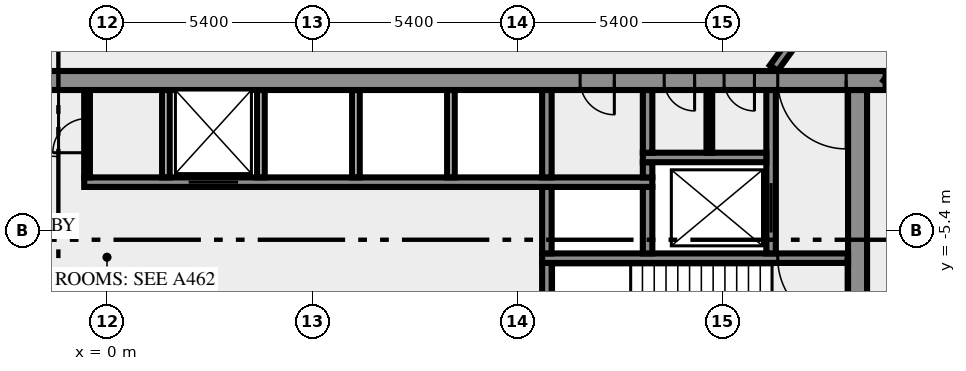
"""IFC4 building model, lengths in metres.
Left out: names, types, materials, properties, quantities, classifications, styles, units other than length and angle.
Written with IfcOpenShell. Run it as: python <this file> out.ifc"""

import sys

from ifc_helpers import new_model, si_unit, direction, frame, frame_2d, origin, place, context, subcontext, project, spatial, rectangle, extrude, element, fill, save


model = new_model("IFC4")
c1 = context("Model", 3, precision=1e-05, world=origin(), true_north=direction((0.0, 1.0)))
c2 = subcontext(c1, "Body", "Model", "MODEL_VIEW")
j1 = project(units=[si_unit("LENGTHUNIT", "METRE"), si_unit("PLANEANGLEUNIT", "RADIAN")], contexts=[c1])
p1 = place(None, origin())
s1 = spatial("IfcSite", under=j1, at=p1, CompositionType="ELEMENT")
p2 = place(p1, origin())
s2 = spatial("IfcBuilding", under=s1, at=p2, CompositionType="ELEMENT")
p3 = place(p2, frame((0.0, 0.0, 75.0)))
s3 = spatial("IfcBuildingStorey", under=s2, at=p3, CompositionType="ELEMENT", Elevation=75.0)
p4 = place(p3, frame((19.75, -10.5, 0.0), z_axis=(0.0, 0.0, 1.0), x_axis=(0.0, 1.0, 0.0)))
e1 = element("IfcWall", 1, at=p4, inside=s3, PredefinedType="SHEAR", context=c2, shape_type="SweptSolid", body=[
    extrude(rectangle(XDim=8.8, YDim=0.5, at=frame_2d((4.4, 0.0))), origin(), (0.0, 0.0, 1.0), 3.4),
])
p5 = place(p3, frame((11.575, -7.25, 0.0), z_axis=(0.0, 0.0, 1.0), x_axis=(0.0, 1.0, 0.0)))
e2 = element("IfcWall", 2, at=p5, inside=s3, PredefinedType="SHEAR", context=c2, shape_type="SweptSolid", body=[
    extrude(rectangle(XDim=1.0, YDim=0.25, at=frame_2d((0.5, 0.0))), origin(), (0.0, 0.0, 1.0), 3.4),
])
p6 = place(p3, frame((19.5, -6.125, 0.0), z_axis=(0.0, 0.0, 1.0), x_axis=(-1.0, 0.0, 0.0)))
e3 = element("IfcWall", 3, at=p6, inside=s3, PredefinedType="SHEAR", context=c2, shape_type="SweptSolid", body=[
    extrude(rectangle(XDim=8.05, YDim=0.25, at=frame_2d((4.025, 0.0))), origin(), (0.0, 0.0, 1.0), 3.4),
])
p7 = place(p6, frame((0.05, 0.0, 0.0)))
e4 = element("IfcOpeningElement", 4, at=p7, cuts=e3, PredefinedType="OPENING", context=c2, shape_type="SweptSolid", body=[
    extrude(rectangle(XDim=1.8, YDim=2.1, at=frame_2d((0.9, 1.05))), frame((0.0, 0.135, 0.0), z_axis=(0.0, -1.0, 0.0), x_axis=(1.0, 0.0, 0.0)), (0.0, 0.0, 1.0), 0.27),
])
for number, where, z_axis, x_axis in (
    (5, (11.575, -6.0, 0.0), (0.0, 0.0, 1.0), (0.0, 1.0, 0.0)),
    (6, (14.225, -6.0, 0.0), (0.0, 0.0, 1.0), (0.0, 1.0, 0.0)),
):
    element("IfcWall", number, at=place(p3, frame(where, z_axis=z_axis, x_axis=x_axis)), inside=s3, PredefinedType="SHEAR", context=c2, shape_type="SweptSolid", body=[
        extrude(rectangle(XDim=1.75, YDim=0.25, at=frame_2d((0.875, 0.0))), origin(), (0.0, 0.0, 1.0), 3.4),
    ])
p8 = place(p3, frame((17.475, -6.0, 0.0), z_axis=(0.0, 0.0, 1.0), x_axis=(0.0, 1.0, 0.0)))
e7 = element("IfcWall", 7, at=p8, inside=s3, PredefinedType="SHEAR", context=c2, shape_type="SweptSolid", body=[
    extrude(rectangle(XDim=4.3, YDim=0.25, at=frame_2d((2.15, 0.0))), origin(), (0.0, 0.0, 1.0), 3.4),
])
p9 = place(p8, frame((0.55, 0.0, 0.0)))
e8 = element("IfcOpeningElement", 8, at=p9, cuts=e7, PredefinedType="OPENING", context=c2, shape_type="SweptSolid", body=[
    extrude(rectangle(XDim=1.3, YDim=2.1, at=frame_2d((0.65, 1.05))), frame((0.0, 0.135, 0.0), z_axis=(0.0, -1.0, 0.0), x_axis=(1.0, 0.0, 0.0)), (0.0, 0.0, 1.0), 0.27),
])
p10 = place(p3, frame((-0.6, -4.125, 0.0), z_axis=(0.0, 0.0, 1.0), x_axis=(1.0, 0.0, 0.0)))
e9 = element("IfcWall", 9, at=p10, inside=s3, PredefinedType="SHEAR", context=c2, shape_type="SweptSolid", body=[
    extrude(rectangle(XDim=14.95, YDim=0.25, at=frame_2d((7.475, 0.0))), origin(), (0.0, 0.0, 1.0), 3.4),
])
p11 = place(p10, frame((2.75, 0.0, 0.0)))
e10 = element("IfcOpeningElement", 10, at=p11, cuts=e9, PredefinedType="OPENING", context=c2, shape_type="SweptSolid", body=[
    extrude(rectangle(XDim=1.3, YDim=2.1, at=frame_2d((0.65, 1.05))), frame((0.0, 0.135, 0.0), z_axis=(0.0, -1.0, 0.0), x_axis=(1.0, 0.0, 0.0)), (0.0, 0.0, 1.0), 0.27),
])
p12 = place(p3, frame((-0.525, -4.0, 0.0), z_axis=(0.0, 0.0, 1.0), x_axis=(0.0, 1.0, 0.0)))
e11 = element("IfcWall", 11, at=p12, inside=s3, PredefinedType="PARTITIONING", context=c2, shape_type="SweptSolid", body=[
    extrude(rectangle(XDim=2.3, YDim=0.15, at=frame_2d((1.15, 0.0))), origin(), (0.0, 0.0, 1.0), 3.4),
])
p13 = place(p12, frame((0.65, 0.0, 0.0)))
e12 = element("IfcOpeningElement", 12, at=p13, cuts=e11, PredefinedType="OPENING", context=c2, shape_type="SweptSolid", body=[
    extrude(rectangle(XDim=0.9, YDim=2.1, at=frame_2d((0.45, 1.05))), frame((0.0, 0.085, 0.0), z_axis=(0.0, -1.0, 0.0), x_axis=(1.0, 0.0, 0.0)), (0.0, 0.0, 1.0), 0.17),
])
for number, where, z_axis, x_axis in (
    (13, (1.55, -4.0, 0.0), (0.0, 0.0, 1.0), (0.0, 1.0, 0.0)),
    (14, (4.05, -4.0, 0.0), (0.0, 0.0, 1.0), (0.0, 1.0, 0.0)),
    (15, (6.55, -4.0, 0.0), (0.0, 0.0, 1.0), (0.0, 1.0, 0.0)),
    (16, (9.05, -4.0, 0.0), (0.0, 0.0, 1.0), (0.0, 1.0, 0.0)),
):
    element("IfcWall", number, at=place(p3, frame(where, z_axis=z_axis, x_axis=x_axis)), inside=s3, PredefinedType="SOLIDWALL", context=c2, shape_type="SweptSolid", body=[
        extrude(rectangle(XDim=2.3, YDim=0.2, at=frame_2d((1.15, 0.0))), origin(), (0.0, 0.0, 1.0), 3.4),
    ])
p14 = place(p3, frame((11.575, -4.0, 0.0), z_axis=(0.0, 0.0, 1.0), x_axis=(0.0, 1.0, 0.0)))
e17 = element("IfcWall", 17, at=p14, inside=s3, PredefinedType="SHEAR", context=c2, shape_type="SweptSolid", body=[
    extrude(rectangle(XDim=2.3, YDim=0.25, at=frame_2d((1.15, 0.0))), origin(), (0.0, 0.0, 1.0), 3.4),
])
p15 = place(p3, frame((14.225, -4.0, 0.0), z_axis=(0.0, 0.0, 1.0), x_axis=(0.0, 1.0, 0.0)))
e18 = element("IfcWall", 18, at=p15, inside=s3, PredefinedType="SHEAR", context=c2, shape_type="SweptSolid", body=[
    extrude(rectangle(XDim=0.4, YDim=0.25, at=frame_2d((0.2, 0.0))), origin(), (0.0, 0.0, 1.0), 3.4),
])
p16 = place(p3, frame((14.1, -3.475, 0.0), z_axis=(0.0, 0.0, 1.0), x_axis=(1.0, 0.0, 0.0)))
e19 = element("IfcWall", 19, at=p16, inside=s3, PredefinedType="SHEAR", context=c2, shape_type="SweptSolid", body=[
    extrude(rectangle(XDim=3.25, YDim=0.25, at=frame_2d((1.625, 0.0))), origin(), (0.0, 0.0, 1.0), 3.4),
])
p17 = place(p3, frame((14.225, -3.35, 0.0), z_axis=(0.0, 0.0, 1.0), x_axis=(0.0, 1.0, 0.0)))
e20 = element("IfcWall", 20, at=p17, inside=s3, PredefinedType="SHEAR", context=c2, shape_type="SweptSolid", body=[
    extrude(rectangle(XDim=1.65, YDim=0.25, at=frame_2d((0.825, 0.0))), origin(), (0.0, 0.0, 1.0), 3.4),
])
p18 = place(p3, frame((15.85, -3.35, 0.0), z_axis=(0.0, 0.0, 1.0), x_axis=(0.0, 1.0, 0.0)))
e21 = element("IfcWall", 21, at=p18, inside=s3, PredefinedType="PARTITIONING", context=c2, shape_type="SweptSolid", body=[
    extrude(rectangle(XDim=1.65, YDim=0.15, at=frame_2d((0.825, 0.0))), origin(), (0.0, 0.0, 1.0), 3.4),
])
p19 = place(p3, frame((20.49, -1.45, 0.0), z_axis=(0.0, 0.0, 1.0), x_axis=(-1.0, 0.0, 0.0)))
e22 = element("IfcWall", 22, at=p19, inside=s3, PredefinedType="SHEAR", context=c2, shape_type="SweptSolid", body=[
    extrude(rectangle(XDim=40.98, YDim=0.5, at=frame_2d((20.49, 0.0))), origin(), (0.0, 0.0, 1.0), 3.4),
])
p20 = place(p19, frame((38.14, 0.0, 0.0)))
e23 = element("IfcOpeningElement", 23, at=p20, cuts=e22, PredefinedType="OPENING", context=c2, shape_type="SweptSolid", body=[
    extrude(rectangle(XDim=1.8, YDim=2.1, at=frame_2d((0.9, 1.05))), frame((0.0, 0.26, 0.0), z_axis=(0.0, -1.0, 0.0), x_axis=(1.0, 0.0, 0.0)), (0.0, 0.0, 1.0), 0.52),
])
p21 = place(p19, frame((35.89, 0.0, 0.0)))
e24 = element("IfcOpeningElement", 24, at=p21, cuts=e22, PredefinedType="OPENING", context=c2, shape_type="SweptSolid", body=[
    extrude(rectangle(XDim=0.9, YDim=2.1, at=frame_2d((0.45, 1.05))), frame((0.0, 0.26, 0.0), z_axis=(0.0, -1.0, 0.0), x_axis=(1.0, 0.0, 0.0)), (0.0, 0.0, 1.0), 0.52),
])
p22 = place(p19, frame((32.94, 0.0, 0.0)))
e25 = element("IfcOpeningElement", 25, at=p22, cuts=e22, PredefinedType="OPENING", context=c2, shape_type="SweptSolid", body=[
    extrude(rectangle(XDim=0.9, YDim=2.1, at=frame_2d((0.45, 1.05))), frame((0.0, 0.26, 0.0), z_axis=(0.0, -1.0, 0.0), x_axis=(1.0, 0.0, 0.0)), (0.0, 0.0, 1.0), 0.52),
])
p23 = place(p19, frame((21.765, 0.0, 0.0)))
e26 = element("IfcOpeningElement", 26, at=p23, cuts=e22, PredefinedType="OPENING", context=c2, shape_type="SweptSolid", body=[
    extrude(rectangle(XDim=2.0, YDim=2.1, at=frame_2d((1.0, 1.05))), frame((0.0, 0.26, 0.0), z_axis=(0.0, -1.0, 0.0), x_axis=(1.0, 0.0, 0.0)), (0.0, 0.0, 1.0), 0.52),
])
p24 = place(p19, frame((7.14, 0.0, 0.0)))
e27 = element("IfcOpeningElement", 27, at=p24, cuts=e22, PredefinedType="OPENING", context=c2, shape_type="SweptSolid", body=[
    extrude(rectangle(XDim=0.9, YDim=2.1, at=frame_2d((0.45, 1.05))), frame((0.0, 0.26, 0.0), z_axis=(0.0, -1.0, 0.0), x_axis=(1.0, 0.0, 0.0)), (0.0, 0.0, 1.0), 0.52),
])
p25 = place(p19, frame((5.028, 0.0, 0.0)))
e28 = element("IfcOpeningElement", 28, at=p25, cuts=e22, PredefinedType="OPENING", context=c2, shape_type="SweptSolid", body=[
    extrude(rectangle(XDim=0.8, YDim=2.1, at=frame_2d((0.4, 1.05))), frame((0.0, 0.26, 0.0), z_axis=(0.0, -1.0, 0.0), x_axis=(1.0, 0.0, 0.0)), (0.0, 0.0, 1.0), 0.52),
])
p26 = place(p19, frame((3.452, 0.0, 0.0)))
e29 = element("IfcOpeningElement", 29, at=p26, cuts=e22, PredefinedType="OPENING", context=c2, shape_type="SweptSolid", body=[
    extrude(rectangle(XDim=0.8, YDim=2.1, at=frame_2d((0.4, 1.05))), frame((0.0, 0.26, 0.0), z_axis=(0.0, -1.0, 0.0), x_axis=(1.0, 0.0, 0.0)), (0.0, 0.0, 1.0), 0.52),
])
p27 = place(p19, frame((1.04, 0.0, 0.0)))
e30 = element("IfcOpeningElement", 30, at=p27, cuts=e22, PredefinedType="OPENING", context=c2, shape_type="SweptSolid", body=[
    extrude(rectangle(XDim=1.8, YDim=2.1, at=frame_2d((0.9, 1.05))), frame((0.0, 0.26, 0.0), z_axis=(0.0, -1.0, 0.0), x_axis=(1.0, 0.0, 0.0)), (0.0, 0.0, 1.0), 0.52),
])
p28 = place(p3, frame((17.545, -1.125, 0.0), z_axis=(0.0, 0.0, 1.0), x_axis=(0.587786323093, 0.809016216391, 0.0)))
e31 = element("IfcWall", 31, at=p28, inside=s3, PredefinedType="SOLIDWALL", context=c2, shape_type="SweptSolid", body=[
    extrude(rectangle(XDim=33.493, YDim=0.25, at=frame_2d((16.747, 0.0))), origin(), (0.0, 0.0, 1.0), 3.4),
])
p29 = place(p28, frame((27.458, 0.0, 0.0)))
e32 = element("IfcOpeningElement", 32, at=p29, cuts=e31, PredefinedType="OPENING", context=c2, shape_type="SweptSolid", body=[
    extrude(rectangle(XDim=1.8, YDim=2.1, at=frame_2d((0.9, 1.05))), frame((0.0, 0.135, 0.0), z_axis=(0.0, -1.0, 0.0), x_axis=(1.0, 0.0, 0.0)), (0.0, 0.0, 1.0), 0.27),
])
p30 = place(p28, frame((3.392, 0.0, 0.0)))
e33 = element("IfcOpeningElement", 33, at=p30, cuts=e31, PredefinedType="OPENING", context=c2, shape_type="SweptSolid", body=[
    extrude(rectangle(XDim=1.8, YDim=2.1, at=frame_2d((0.9, 1.05))), frame((0.0, 0.135, 0.0), z_axis=(0.0, -1.0, 0.0), x_axis=(1.0, 0.0, 0.0)), (0.0, 0.0, 1.0), 0.27),
])
p31 = place(p28, frame((32.253, 0.0, 0.0)))
e34 = element("IfcOpeningElement", 34, at=p31, cuts=e31, PredefinedType="OPENING", context=c2, shape_type="SweptSolid", body=[
    extrude(rectangle(XDim=0.9, YDim=2.1, at=frame_2d((0.45, 1.05))), frame((0.0, 0.135, 0.0), z_axis=(0.0, -1.0, 0.0), x_axis=(1.0, 0.0, 0.0)), (0.0, 0.0, 1.0), 0.27),
])
p32 = place(p3, frame((43.467, 30.045, 0.0), z_axis=(0.0, 0.0, 1.0), x_axis=(-0.587784726077, -0.809017376692, 0.0)))
e35 = element("IfcWall", 35, at=p32, inside=s3, PredefinedType="SOLIDWALL", context=c2, shape_type="SweptSolid", body=[
    extrude(rectangle(XDim=39.02, YDim=0.25, at=frame_2d((19.51, 0.0))), origin(), (0.0, 0.0, 1.0), 3.4),
])
p33 = place(p32, frame((26.254, 0.0, 0.0)))
e36 = element("IfcOpeningElement", 36, at=p33, cuts=e35, PredefinedType="OPENING", context=c2, shape_type="SweptSolid", body=[
    extrude(rectangle(XDim=0.9, YDim=2.1, at=frame_2d((0.45, 1.05))), frame((0.0, 0.135, 0.0), z_axis=(0.0, -1.0, 0.0), x_axis=(1.0, 0.0, 0.0)), (0.0, 0.0, 1.0), 0.27),
])
p34 = place(p32, frame((2.205, 0.0, 0.0)))
e37 = element("IfcOpeningElement", 37, at=p34, cuts=e35, PredefinedType="OPENING", context=c2, shape_type="SweptSolid", body=[
    extrude(rectangle(XDim=0.9, YDim=2.1, at=frame_2d((0.45, 1.05))), frame((0.0, 0.135, 0.0), z_axis=(0.0, -1.0, 0.0), x_axis=(1.0, 0.0, 0.0)), (0.0, 0.0, 1.0), 0.27),
])
p35 = place(p32, frame((27.855, 0.0, 0.0)))
e38 = element("IfcOpeningElement", 38, at=p35, cuts=e35, PredefinedType="OPENING", context=c2, shape_type="SweptSolid", body=[
    extrude(rectangle(XDim=0.9, YDim=2.1, at=frame_2d((0.45, 1.05))), frame((0.0, 0.135, 0.0), z_axis=(0.0, -1.0, 0.0), x_axis=(1.0, 0.0, 0.0)), (0.0, 0.0, 1.0), 0.27),
])
p36 = place(p32, frame((18.155, 0.0, 0.0)))
e39 = element("IfcOpeningElement", 39, at=p36, cuts=e35, PredefinedType="OPENING", context=c2, shape_type="SweptSolid", body=[
    extrude(rectangle(XDim=0.9, YDim=2.1, at=frame_2d((0.45, 1.05))), frame((0.0, 0.135, 0.0), z_axis=(0.0, -1.0, 0.0), x_axis=(1.0, 0.0, 0.0)), (0.0, 0.0, 1.0), 0.27),
])
p37 = place(p32, frame((19.755, 0.0, 0.0)))
e40 = element("IfcOpeningElement", 40, at=p37, cuts=e35, PredefinedType="OPENING", context=c2, shape_type="SweptSolid", body=[
    extrude(rectangle(XDim=0.9, YDim=2.1, at=frame_2d((0.45, 1.05))), frame((0.0, 0.135, 0.0), z_axis=(0.0, -1.0, 0.0), x_axis=(1.0, 0.0, 0.0)), (0.0, 0.0, 1.0), 0.27),
])
p38 = place(p32, frame((0.224, 0.0, 0.0)))
e41 = element("IfcOpeningElement", 41, at=p38, cuts=e35, PredefinedType="OPENING", context=c2, shape_type="SweptSolid", body=[
    extrude(rectangle(XDim=0.9, YDim=2.1, at=frame_2d((0.45, 1.05))), frame((0.0, 0.135, 0.0), z_axis=(0.0, -1.0, 0.0), x_axis=(1.0, 0.0, 0.0)), (0.0, 0.0, 1.0), 0.27),
])
p39 = place(p7, origin())
e42 = element("IfcDoor", 42, at=p39, inside=s3, OperationType="DOUBLE_DOOR_SINGLE_SWING", PredefinedType="DOOR", context=c2, shape_type="SweptSolid", body=[
    extrude(rectangle(XDim=1.8, YDim=2.1, at=frame_2d((0.9, 1.05))), frame((0.0, 0.025, 0.0), z_axis=(0.0, -1.0, 0.0), x_axis=(1.0, 0.0, 0.0)), (0.0, 0.0, 1.0), 0.05),
])
fill(e4, e42)
p40 = place(p9, origin())
e43 = element("IfcDoor", 43, at=p40, inside=s3, OperationType="DOUBLE_DOOR_SLIDING", PredefinedType="DOOR", context=c2, shape_type="SweptSolid", body=[
    extrude(rectangle(XDim=1.3, YDim=2.1, at=frame_2d((0.65, 1.05))), frame((0.0, 0.025, 0.0), z_axis=(0.0, -1.0, 0.0), x_axis=(1.0, 0.0, 0.0)), (0.0, 0.0, 1.0), 0.05),
])
fill(e8, e43)
p41 = place(p11, origin())
e44 = element("IfcDoor", 44, at=p41, inside=s3, OperationType="DOUBLE_DOOR_SLIDING", PredefinedType="DOOR", context=c2, shape_type="SweptSolid", body=[
    extrude(rectangle(XDim=1.3, YDim=2.1, at=frame_2d((0.65, 1.05))), frame((0.0, 0.025, 0.0), z_axis=(0.0, -1.0, 0.0), x_axis=(1.0, 0.0, 0.0)), (0.0, 0.0, 1.0), 0.05),
])
fill(e10, e44)
p42 = place(p13, origin())
e45 = element("IfcDoor", 45, at=p42, inside=s3, OperationType="SINGLE_SWING_LEFT", PredefinedType="DOOR", context=c2, shape_type="SweptSolid", body=[
    extrude(rectangle(XDim=0.9, YDim=2.1, at=frame_2d((0.45, 1.05))), frame((0.0, 0.025, 0.0), z_axis=(0.0, -1.0, 0.0), x_axis=(1.0, 0.0, 0.0)), (0.0, 0.0, 1.0), 0.05),
])
fill(e12, e45)
p43 = place(p23, origin())
e46 = element("IfcDoor", 46, at=p43, inside=s3, OperationType="DOUBLE_DOOR_SINGLE_SWING", PredefinedType="DOOR", context=c2, shape_type="SweptSolid", body=[
    extrude(rectangle(XDim=2.0, YDim=2.1, at=frame_2d((1.0, 1.05))), frame((0.0, 0.025, 0.0), z_axis=(0.0, -1.0, 0.0), x_axis=(1.0, 0.0, 0.0)), (0.0, 0.0, 1.0), 0.05),
])
fill(e26, e46)
p44 = place(p24, origin())
e47 = element("IfcDoor", 47, at=p44, inside=s3, OperationType="SINGLE_SWING_LEFT", PredefinedType="DOOR", context=c2, shape_type="SweptSolid", body=[
    extrude(rectangle(XDim=0.9, YDim=2.1, at=frame_2d((0.45, 1.05))), frame((0.0, 0.025, 0.0), z_axis=(0.0, -1.0, 0.0), x_axis=(1.0, 0.0, 0.0)), (0.0, 0.0, 1.0), 0.05),
])
fill(e27, e47)
p45 = place(p25, origin())
e48 = element("IfcDoor", 48, at=p45, inside=s3, OperationType="SINGLE_SWING_LEFT", PredefinedType="DOOR", context=c2, shape_type="SweptSolid", body=[
    extrude(rectangle(XDim=0.8, YDim=2.1, at=frame_2d((0.4, 1.05))), frame((0.0, 0.025, 0.0), z_axis=(0.0, -1.0, 0.0), x_axis=(1.0, 0.0, 0.0)), (0.0, 0.0, 1.0), 0.05),
])
fill(e28, e48)
p46 = place(p26, origin())
e49 = element("IfcDoor", 49, at=p46, inside=s3, OperationType="SINGLE_SWING_LEFT", PredefinedType="DOOR", context=c2, shape_type="SweptSolid", body=[
    extrude(rectangle(XDim=0.8, YDim=2.1, at=frame_2d((0.4, 1.05))), frame((0.0, 0.025, 0.0), z_axis=(0.0, -1.0, 0.0), x_axis=(1.0, 0.0, 0.0)), (0.0, 0.0, 1.0), 0.05),
])
fill(e29, e49)
p47 = place(p27, origin())
e50 = element("IfcDoor", 50, at=p47, inside=s3, OperationType="DOUBLE_DOOR_SINGLE_SWING", PredefinedType="DOOR", context=c2, shape_type="SweptSolid", body=[
    extrude(rectangle(XDim=1.8, YDim=2.1, at=frame_2d((0.9, 1.05))), frame((0.0, 0.025, 0.0), z_axis=(0.0, -1.0, 0.0), x_axis=(1.0, 0.0, 0.0)), (0.0, 0.0, 1.0), 0.05),
])
fill(e30, e50)
save(model, sys.argv[1])
